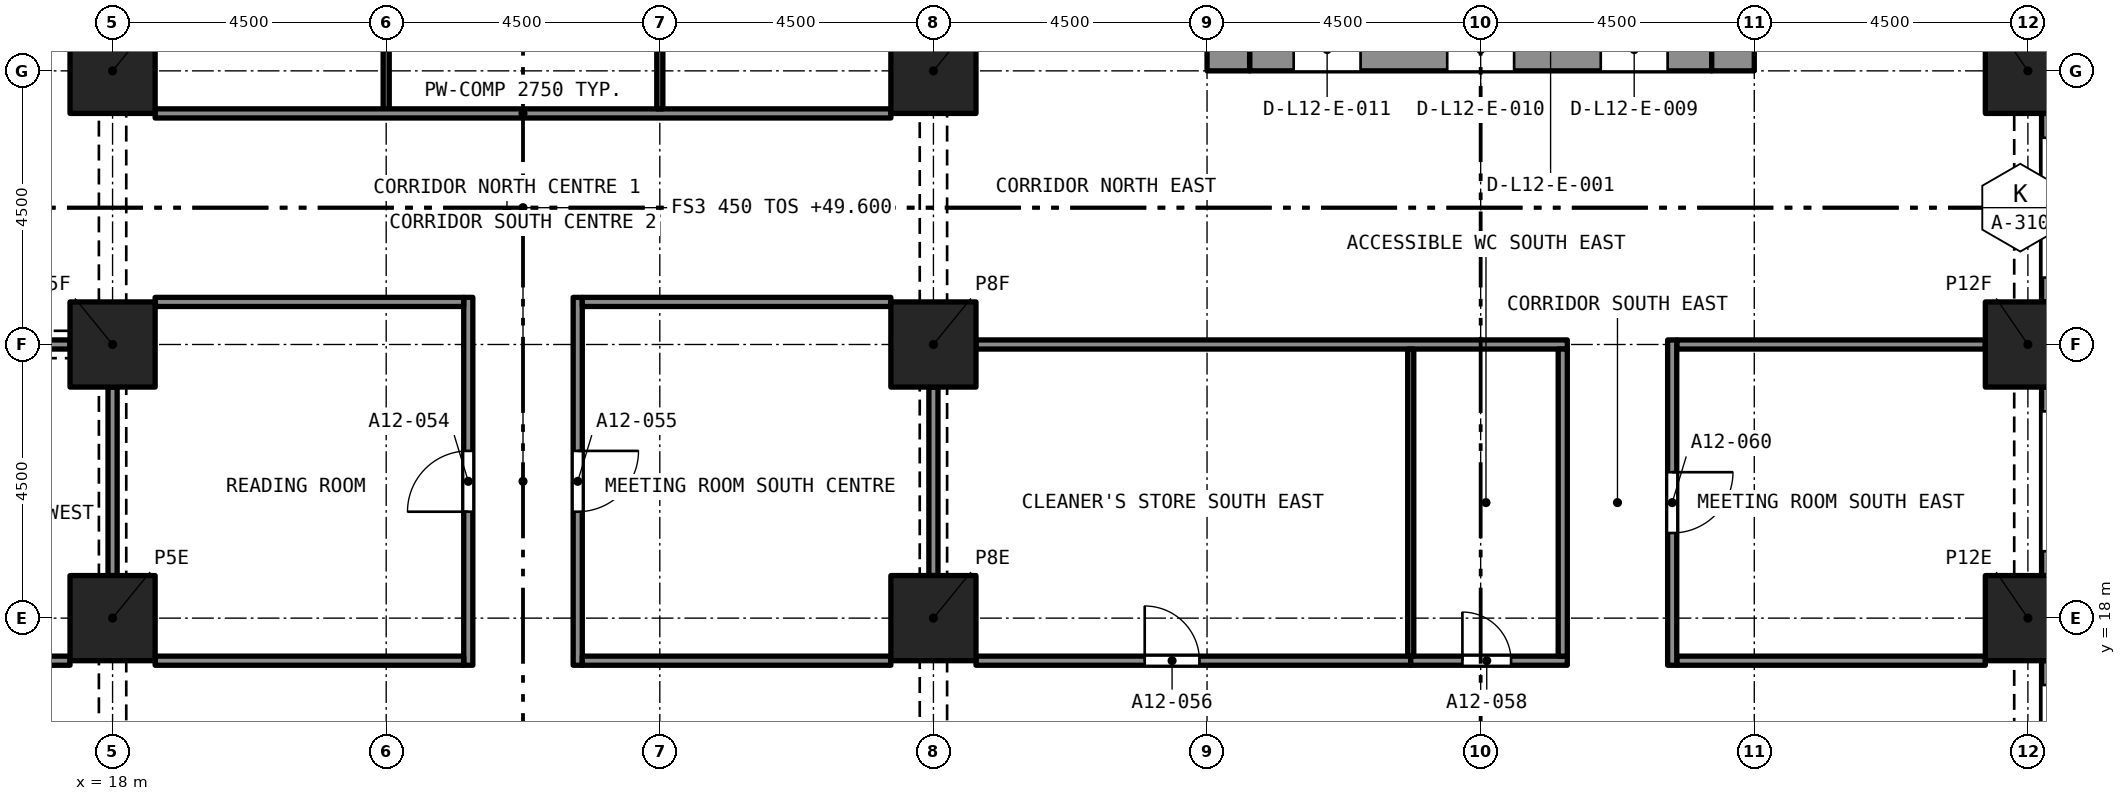
"""IFC4 building model, lengths in metres.
Left out: names, types, materials, properties, quantities, classifications, styles, units other than length and angle.
Written with IfcOpenShell. Run it as: python <this file> out.ifc"""

import sys

from ifc_helpers import new_model, si_unit, direction, frame, frame_2d, origin, origin_2d, place, context, subcontext, project, spatial, rectangle, extrude, element, fill, save


model = new_model("IFC4")
c1 = context("Model", 3, precision=1e-05, world=origin(), true_north=direction((0.0, 1.0)))
c2 = subcontext(c1, "Body", "Model", "MODEL_VIEW")
j1 = project(units=[si_unit("LENGTHUNIT", "METRE"), si_unit("PLANEANGLEUNIT", "RADIAN")], contexts=[c1])
p1 = place(None, origin())
s1 = spatial("IfcSite", under=j1, at=p1, CompositionType="ELEMENT")
p2 = place(p1, origin())
s2 = spatial("IfcBuilding", under=s1, at=p2, CompositionType="ELEMENT")
p3 = place(p2, frame((0.0, 0.0, 49.6)))
s3 = spatial("IfcBuildingStorey", under=s2, at=p3, CompositionType="ELEMENT", Elevation=49.6)
for number, where, z_axis, x_axis in (
    (1, (18.0, 18.0, 0.0), (0.0, 0.0, 1.0), (1.0, 0.0, 0.0)),
    (2, (31.5, 18.0, 0.0), (0.0, 0.0, 1.0), (1.0, 0.0, 0.0)),
    (3, (49.5, 18.0, 0.0), (0.0, 0.0, 1.0), (1.0, 0.0, 0.0)),
    (4, (18.0, 22.5, 0.0), (0.0, 0.0, 1.0), (1.0, 0.0, 0.0)),
    (5, (31.5, 22.5, 0.0), (0.0, 0.0, 1.0), (1.0, 0.0, 0.0)),
    (6, (49.5, 22.5, 0.0), (0.0, 0.0, 1.0), (1.0, 0.0, 0.0)),
    (7, (18.0, 27.0, 0.0), (0.0, 0.0, 1.0), (1.0, 0.0, 0.0)),
    (8, (31.5, 27.0, 0.0), (0.0, 0.0, 1.0), (1.0, 0.0, 0.0)),
    (9, (49.5, 27.0, 0.0), (0.0, 0.0, 1.0), (1.0, 0.0, 0.0)),
):
    element("IfcColumn", number, at=place(p3, frame(where, z_axis=z_axis, x_axis=x_axis)), inside=s3, PredefinedType="COLUMN", context=c2, shape_type="SweptSolid", body=[
        extrude(rectangle(XDim=1.4, YDim=1.4, at=origin_2d()), origin(), (0.0, 0.0, 1.0), 3.2),
    ])
p4 = place(p3, frame((36.7, 27.35, 0.0), z_axis=(0.0, 0.0, 1.0), x_axis=(1.0, 0.0, 0.0)))
e10 = element("IfcWall", 10, at=p4, inside=s3, PredefinedType="SOLIDWALL", context=c2, shape_type="SweptSolid", body=[
    extrude(rectangle(XDim=7.6, YDim=0.7, at=frame_2d((3.8, 0.0))), origin(), (0.0, 0.0, 1.0), 3.2),
])
p5 = place(p4, frame((5.775, 0.0, 0.0)))
e11 = element("IfcOpeningElement", 11, at=p5, cuts=e10, PredefinedType="OPENING", context=c2, shape_type="SweptSolid", body=[
    extrude(rectangle(XDim=1.1, YDim=2.1, at=frame_2d((0.55, 1.05))), frame((0.0, 0.36, 0.0), z_axis=(0.0, -1.0, 0.0), x_axis=(1.0, 0.0, 0.0)), (0.0, 0.0, 1.0), 0.72),
])
p6 = place(p4, frame((3.25, 0.0, 0.0)))
e12 = element("IfcOpeningElement", 12, at=p6, cuts=e10, PredefinedType="OPENING", context=c2, shape_type="SweptSolid", body=[
    extrude(rectangle(XDim=1.1, YDim=2.1, at=frame_2d((0.55, 1.05))), frame((0.0, 0.36, 0.0), z_axis=(0.0, -1.0, 0.0), x_axis=(1.0, 0.0, 0.0)), (0.0, 0.0, 1.0), 0.72),
])
p7 = place(p4, frame((0.725, 0.0, 0.0)))
e13 = element("IfcOpeningElement", 13, at=p7, cuts=e10, PredefinedType="OPENING", context=c2, shape_type="SweptSolid", body=[
    extrude(rectangle(XDim=1.1, YDim=2.1, at=frame_2d((0.55, 1.05))), frame((0.0, 0.36, 0.0), z_axis=(0.0, -1.0, 0.0), x_axis=(1.0, 0.0, 0.0)), (0.0, 0.0, 1.0), 0.72),
])
p8 = place(p3, frame((36.35, 27.0, 0.0), z_axis=(0.0, 0.0, 1.0), x_axis=(0.0, 1.0, 0.0)))
e14 = element("IfcWall", 14, at=p8, inside=s3, PredefinedType="SOLIDWALL", context=c2, shape_type="SweptSolid", body=[
    extrude(rectangle(XDim=13.5, YDim=0.7, at=frame_2d((6.75, 0.0))), origin(), (0.0, 0.0, 1.0), 3.2),
])
p9 = place(p8, frame((8.95, 0.0, 0.0)))
e15 = element("IfcOpeningElement", 15, at=p9, cuts=e14, PredefinedType="OPENING", context=c2, shape_type="SweptSolid", body=[
    extrude(rectangle(XDim=1.2, YDim=2.1, at=frame_2d((0.6, 1.05))), frame((0.0, 0.36, 0.0), z_axis=(0.0, -1.0, 0.0), x_axis=(1.0, 0.0, 0.0)), (0.0, 0.0, 1.0), 0.72),
])
p10 = place(p3, frame((44.65, 27.0, 0.0), z_axis=(0.0, 0.0, 1.0), x_axis=(0.0, 1.0, 0.0)))
e16 = element("IfcWall", 16, at=p10, inside=s3, PredefinedType="SOLIDWALL", context=c2, shape_type="SweptSolid", body=[
    extrude(rectangle(XDim=13.5, YDim=0.7, at=frame_2d((6.75, 0.0))), origin(), (0.0, 0.0, 1.0), 3.2),
])
p11 = place(p10, frame((8.95, 0.0, 0.0)))
e17 = element("IfcOpeningElement", 17, at=p11, cuts=e16, PredefinedType="OPENING", context=c2, shape_type="SweptSolid", body=[
    extrude(rectangle(XDim=1.2, YDim=2.1, at=frame_2d((0.6, 1.05))), frame((0.0, 0.36, 0.0), z_axis=(0.0, -1.0, 0.0), x_axis=(1.0, 0.0, 0.0)), (0.0, 0.0, 1.0), 0.72),
])
p12 = place(p3, frame((49.875, 17.3, 0.0), z_axis=(0.0, 0.0, 1.0), x_axis=(0.0, -1.0, 0.0)))
e18 = element("IfcWall", 18, at=p12, inside=s3, PredefinedType="SOLIDWALL", context=c2, shape_type="SweptSolid", body=[
    extrude(rectangle(XDim=3.1, YDim=0.3, at=frame_2d((1.55, 0.0))), origin(), (0.0, 0.0, 1.0), 3.2),
])
p13 = place(p12, frame((0.4, 0.0, 0.45)))
e19 = element("IfcOpeningElement", 19, at=p13, cuts=e18, PredefinedType="OPENING", context=c2, shape_type="SweptSolid", body=[
    extrude(rectangle(XDim=2.3, YDim=1.95, at=frame_2d((1.15, 0.975))), frame((0.0, 0.16, 0.0), z_axis=(0.0, -1.0, 0.0), x_axis=(1.0, 0.0, 0.0)), (0.0, 0.0, 1.0), 0.32),
])
p14 = place(p3, frame((49.875, 21.8, 0.0), z_axis=(0.0, 0.0, 1.0), x_axis=(0.0, -1.0, 0.0)))
e20 = element("IfcWall", 20, at=p14, inside=s3, PredefinedType="SOLIDWALL", context=c2, shape_type="SweptSolid", body=[
    extrude(rectangle(XDim=3.1, YDim=0.3, at=frame_2d((1.55, 0.0))), origin(), (0.0, 0.0, 1.0), 3.2),
])
p15 = place(p14, frame((0.4, 0.0, 0.45)))
e21 = element("IfcOpeningElement", 21, at=p15, cuts=e20, PredefinedType="OPENING", context=c2, shape_type="SweptSolid", body=[
    extrude(rectangle(XDim=2.3, YDim=1.95, at=frame_2d((1.15, 0.975))), frame((0.0, 0.16, 0.0), z_axis=(0.0, -1.0, 0.0), x_axis=(1.0, 0.0, 0.0)), (0.0, 0.0, 1.0), 0.32),
])
p16 = place(p3, frame((49.875, 26.3, 0.0), z_axis=(0.0, 0.0, 1.0), x_axis=(0.0, -1.0, 0.0)))
e22 = element("IfcWall", 22, at=p16, inside=s3, PredefinedType="SOLIDWALL", context=c2, shape_type="SweptSolid", body=[
    extrude(rectangle(XDim=3.1, YDim=0.3, at=frame_2d((1.55, 0.0))), origin(), (0.0, 0.0, 1.0), 3.2),
])
p17 = place(p16, frame((0.4, 0.0, 0.45)))
e23 = element("IfcOpeningElement", 23, at=p17, cuts=e22, PredefinedType="OPENING", context=c2, shape_type="SweptSolid", body=[
    extrude(rectangle(XDim=2.3, YDim=1.95, at=frame_2d((1.15, 0.975))), frame((0.0, 0.16, 0.0), z_axis=(0.0, -1.0, 0.0), x_axis=(1.0, 0.0, 0.0)), (0.0, 0.0, 1.0), 0.32),
])
p18 = place(p3, frame((23.85, 17.225, 0.0), z_axis=(0.0, 0.0, 1.0), x_axis=(0.0, 1.0, 0.0)))
e24 = element("IfcWall", 24, at=p18, inside=s3, PredefinedType="PARTITIONING", context=c2, shape_type="SweptSolid", body=[
    extrude(rectangle(XDim=6.05, YDim=0.15, at=frame_2d((3.025, 0.0))), origin(), (0.0, 0.0, 1.0), 2.75),
])
p19 = place(p18, frame((2.525, 0.0, 0.0)))
e25 = element("IfcOpeningElement", 25, at=p19, cuts=e24, PredefinedType="OPENING", context=c2, shape_type="SweptSolid", body=[
    extrude(rectangle(XDim=1.0, YDim=2.1, at=frame_2d((0.5, 1.05))), frame((0.0, 0.085, 0.0), z_axis=(0.0, -1.0, 0.0), x_axis=(1.0, 0.0, 0.0)), (0.0, 0.0, 1.0), 0.17),
])
p20 = place(p3, frame((25.65, 23.275, 0.0), z_axis=(0.0, 0.0, 1.0), x_axis=(0.0, -1.0, 0.0)))
e26 = element("IfcWall", 26, at=p20, inside=s3, PredefinedType="PARTITIONING", context=c2, shape_type="SweptSolid", body=[
    extrude(rectangle(XDim=6.05, YDim=0.15, at=frame_2d((3.025, 0.0))), origin(), (0.0, 0.0, 1.0), 2.75),
])
p21 = place(p20, frame((2.525, 0.0, 0.0)))
e27 = element("IfcOpeningElement", 27, at=p21, cuts=e26, PredefinedType="OPENING", context=c2, shape_type="SweptSolid", body=[
    extrude(rectangle(XDim=1.0, YDim=2.1, at=frame_2d((0.5, 1.05))), frame((0.0, 0.085, 0.0), z_axis=(0.0, -1.0, 0.0), x_axis=(1.0, 0.0, 0.0)), (0.0, 0.0, 1.0), 0.17),
])
for number, where, z_axis, x_axis in (
    (28, (18.7, 17.3, 0.0), (0.0, 0.0, 1.0), (1.0, 0.0, 0.0)),
    (29, (25.725, 17.3, 0.0), (0.0, 0.0, 1.0), (1.0, 0.0, 0.0)),
):
    element("IfcWall", number, at=place(p3, frame(where, z_axis=z_axis, x_axis=x_axis)), inside=s3, PredefinedType="PARTITIONING", context=c2, shape_type="SweptSolid", body=[
        extrude(rectangle(XDim=5.075, YDim=0.15, at=frame_2d((2.538, 0.0))), origin(), (0.0, 0.0, 1.0), 2.75),
    ])
p22 = place(p3, frame((32.2, 17.3, 0.0), z_axis=(0.0, 0.0, 1.0), x_axis=(1.0, 0.0, 0.0)))
e30 = element("IfcWall", 30, at=p22, inside=s3, PredefinedType="PARTITIONING", context=c2, shape_type="SweptSolid", body=[
    extrude(rectangle(XDim=7.15, YDim=0.15, at=frame_2d((3.575, 0.0))), origin(), (0.0, 0.0, 1.0), 2.9),
])
p23 = place(p22, frame((2.775, 0.0, 0.0)))
e31 = element("IfcOpeningElement", 31, at=p23, cuts=e30, PredefinedType="OPENING", context=c2, shape_type="SweptSolid", body=[
    extrude(rectangle(XDim=0.9, YDim=2.1, at=frame_2d((0.45, 1.05))), frame((0.0, 0.085, 0.0), z_axis=(0.0, -1.0, 0.0), x_axis=(1.0, 0.0, 0.0)), (0.0, 0.0, 1.0), 0.17),
])
p24 = place(p3, frame((10.15, 17.3, 0.0), z_axis=(0.0, 0.0, 1.0), x_axis=(1.0, 0.0, 0.0)))
e32 = element("IfcWall", 32, at=p24, inside=s3, PredefinedType="PARTITIONING", context=c2, shape_type="SweptSolid", body=[
    extrude(rectangle(XDim=7.15, YDim=0.15, at=frame_2d((3.575, 0.0))), origin(), (0.0, 0.0, 1.0), 2.9),
])
p25 = place(p24, frame((3.475, 0.0, 0.0)))
e33 = element("IfcOpeningElement", 33, at=p25, cuts=e32, PredefinedType="OPENING", context=c2, shape_type="SweptSolid", body=[
    extrude(rectangle(XDim=0.9, YDim=2.1, at=frame_2d((0.45, 1.05))), frame((0.0, 0.085, 0.0), z_axis=(0.0, -1.0, 0.0), x_axis=(1.0, 0.0, 0.0)), (0.0, 0.0, 1.0), 0.17),
])
p26 = place(p3, frame((39.35, 17.3, 0.0), z_axis=(0.0, 0.0, 1.0), x_axis=(1.0, 0.0, 0.0)))
e34 = element("IfcWall", 34, at=p26, inside=s3, PredefinedType="PARTITIONING", context=c2, shape_type="SweptSolid", body=[
    extrude(rectangle(XDim=2.575, YDim=0.15, at=frame_2d((1.288, 0.0))), origin(), (0.0, 0.0, 1.0), 2.9),
])
p27 = place(p26, frame((0.85, 0.0, 0.0)))
e35 = element("IfcOpeningElement", 35, at=p27, cuts=e34, PredefinedType="OPENING", context=c2, shape_type="SweptSolid", body=[
    extrude(rectangle(XDim=0.8, YDim=2.1, at=frame_2d((0.4, 1.05))), frame((0.0, 0.085, 0.0), z_axis=(0.0, -1.0, 0.0), x_axis=(1.0, 0.0, 0.0)), (0.0, 0.0, 1.0), 0.17),
])
p28 = place(p3, frame((43.725, 17.3, 0.0), z_axis=(0.0, 0.0, 1.0), x_axis=(1.0, 0.0, 0.0)))
e36 = element("IfcWall", 36, at=p28, inside=s3, PredefinedType="PARTITIONING", context=c2, shape_type="SweptSolid", body=[
    extrude(rectangle(XDim=5.075, YDim=0.15, at=frame_2d((2.538, 0.0))), origin(), (0.0, 0.0, 1.0), 2.9),
])
p29 = place(p3, frame((22.5, 26.375, 0.0), z_axis=(0.0, 0.0, 1.0), x_axis=(0.0, 1.0, 0.0)))
e37 = element("IfcWall", 37, at=p29, inside=s3, PredefinedType="PARTITIONING", context=c2, shape_type="SweptSolid", body=[
    extrude(rectangle(XDim=10.25, YDim=0.1, at=frame_2d((5.125, 0.0))), origin(), (0.0, 0.0, 1.0), 2.75),
])
p30 = place(p3, frame((18.7, 26.3, 0.0), z_axis=(0.0, 0.0, 1.0), x_axis=(1.0, 0.0, 0.0)))
e38 = element("IfcWall", 38, at=p30, inside=s3, PredefinedType="PARTITIONING", context=c2, shape_type="SweptSolid", body=[
    extrude(rectangle(XDim=12.1, YDim=0.15, at=frame_2d((6.05, 0.0))), origin(), (0.0, 0.0, 1.0), 2.75),
])
p31 = place(p3, frame((27.0, 26.375, 0.0), z_axis=(0.0, 0.0, 1.0), x_axis=(0.0, 1.0, 0.0)))
e39 = element("IfcWall", 39, at=p31, inside=s3, PredefinedType="PARTITIONING", context=c2, shape_type="SweptSolid", body=[
    extrude(rectangle(XDim=10.25, YDim=0.1, at=frame_2d((5.125, 0.0))), origin(), (0.0, 0.0, 1.0), 2.75),
])
p32 = place(p3, frame((18.7, 23.2, 0.0), z_axis=(0.0, 0.0, 1.0), x_axis=(1.0, 0.0, 0.0)))
e40 = element("IfcWall", 40, at=p32, inside=s3, PredefinedType="PARTITIONING", context=c2, shape_type="SweptSolid", body=[
    extrude(rectangle(XDim=5.075, YDim=0.15, at=frame_2d((2.538, 0.0))), origin(), (0.0, 0.0, 1.0), 2.75),
])
p33 = place(p3, frame((18.0, 18.7, 0.0), z_axis=(0.0, 0.0, 1.0), x_axis=(0.0, 1.0, 0.0)))
e41 = element("IfcWall", 41, at=p33, inside=s3, PredefinedType="PARTITIONING", context=c2, shape_type="SweptSolid", body=[
    extrude(rectangle(XDim=3.1, YDim=0.15, at=frame_2d((1.55, 0.0))), origin(), (0.0, 0.0, 1.0), 2.38),
])
p34 = place(p3, frame((25.725, 23.2, 0.0), z_axis=(0.0, 0.0, 1.0), x_axis=(1.0, 0.0, 0.0)))
e42 = element("IfcWall", 42, at=p34, inside=s3, PredefinedType="PARTITIONING", context=c2, shape_type="SweptSolid", body=[
    extrude(rectangle(XDim=5.075, YDim=0.15, at=frame_2d((2.538, 0.0))), origin(), (0.0, 0.0, 1.0), 2.75),
])
p35 = place(p3, frame((31.5, 18.7, 0.0), z_axis=(0.0, 0.0, 1.0), x_axis=(0.0, 1.0, 0.0)))
e43 = element("IfcWall", 43, at=p35, inside=s3, PredefinedType="PARTITIONING", context=c2, shape_type="SweptSolid", body=[
    extrude(rectangle(XDim=3.1, YDim=0.15, at=frame_2d((1.55, 0.0))), origin(), (0.0, 0.0, 1.0), 2.38),
])
p36 = place(p3, frame((32.2, 22.5, 0.0), z_axis=(0.0, 0.0, 1.0), x_axis=(1.0, 0.0, 0.0)))
e44 = element("IfcWall", 44, at=p36, inside=s3, PredefinedType="PARTITIONING", context=c2, shape_type="SweptSolid", body=[
    extrude(rectangle(XDim=9.725, YDim=0.15, at=frame_2d((4.863, 0.0))), origin(), (0.0, 0.0, 1.0), 2.9),
])
p37 = place(p3, frame((43.725, 22.5, 0.0), z_axis=(0.0, 0.0, 1.0), x_axis=(1.0, 0.0, 0.0)))
e45 = element("IfcWall", 45, at=p37, inside=s3, PredefinedType="PARTITIONING", context=c2, shape_type="SweptSolid", body=[
    extrude(rectangle(XDim=5.075, YDim=0.15, at=frame_2d((2.538, 0.0))), origin(), (0.0, 0.0, 1.0), 2.9),
])
p38 = place(p3, frame((14.2, 22.5, 0.0), z_axis=(0.0, 0.0, 1.0), x_axis=(1.0, 0.0, 0.0)))
e46 = element("IfcWall", 46, at=p38, inside=s3, PredefinedType="PARTITIONING", context=c2, shape_type="SweptSolid", body=[
    extrude(rectangle(XDim=3.1, YDim=0.15, at=frame_2d((1.55, 0.0))), origin(), (0.0, 0.0, 1.0), 2.38),
])
p39 = place(p3, frame((41.85, 17.375, 0.0), z_axis=(0.0, 0.0, 1.0), x_axis=(0.0, 1.0, 0.0)))
e47 = element("IfcWall", 47, at=p39, inside=s3, PredefinedType="PARTITIONING", context=c2, shape_type="SweptSolid", body=[
    extrude(rectangle(XDim=5.05, YDim=0.15, at=frame_2d((2.525, 0.0))), origin(), (0.0, 0.0, 1.0), 2.9),
])
p40 = place(p3, frame((43.65, 22.575, 0.0), z_axis=(0.0, 0.0, 1.0), x_axis=(0.0, -1.0, 0.0)))
e48 = element("IfcWall", 48, at=p40, inside=s3, PredefinedType="PARTITIONING", context=c2, shape_type="SweptSolid", body=[
    extrude(rectangle(XDim=5.35, YDim=0.15, at=frame_2d((2.675, 0.0))), origin(), (0.0, 0.0, 1.0), 2.9),
])
p41 = place(p40, frame((2.175, 0.0, 0.0)))
e49 = element("IfcOpeningElement", 49, at=p41, cuts=e48, PredefinedType="OPENING", context=c2, shape_type="SweptSolid", body=[
    extrude(rectangle(XDim=1.0, YDim=2.1, at=frame_2d((0.5, 1.05))), frame((0.0, 0.085, 0.0), z_axis=(0.0, -1.0, 0.0), x_axis=(1.0, 0.0, 0.0)), (0.0, 0.0, 1.0), 0.17),
])
p42 = place(p3, frame((39.35, 17.375, 0.0), z_axis=(0.0, 0.0, 1.0), x_axis=(0.0, 1.0, 0.0)))
e50 = element("IfcWall", 50, at=p42, inside=s3, PredefinedType="PARTITIONING", context=c2, shape_type="SweptSolid", body=[
    extrude(rectangle(XDim=5.05, YDim=0.1, at=frame_2d((2.525, 0.0))), origin(), (0.0, 0.0, 1.0), 2.9),
])
p43 = place(p19, origin())
e51 = element("IfcDoor", 51, at=p43, inside=s3, OperationType="SINGLE_SWING_RIGHT", PredefinedType="DOOR", context=c2, shape_type="SweptSolid", body=[
    extrude(rectangle(XDim=1.0, YDim=2.1, at=frame_2d((0.5, 1.05))), frame((0.0, 0.025, 0.0), z_axis=(0.0, -1.0, 0.0), x_axis=(1.0, 0.0, 0.0)), (0.0, 0.0, 1.0), 0.05),
])
fill(e25, e51)
p44 = place(p21, origin())
e52 = element("IfcDoor", 52, at=p44, inside=s3, OperationType="SINGLE_SWING_RIGHT", PredefinedType="DOOR", context=c2, shape_type="SweptSolid", body=[
    extrude(rectangle(XDim=1.0, YDim=2.1, at=frame_2d((0.5, 1.05))), frame((0.0, 0.025, 0.0), z_axis=(0.0, -1.0, 0.0), x_axis=(1.0, 0.0, 0.0)), (0.0, 0.0, 1.0), 0.05),
])
fill(e27, e52)
p45 = place(p23, origin())
e53 = element("IfcDoor", 53, at=p45, inside=s3, OperationType="SINGLE_SWING_LEFT", PredefinedType="DOOR", context=c2, shape_type="SweptSolid", body=[
    extrude(rectangle(XDim=0.9, YDim=2.1, at=frame_2d((0.45, 1.05))), frame((0.0, 0.025, 0.0), z_axis=(0.0, -1.0, 0.0), x_axis=(1.0, 0.0, 0.0)), (0.0, 0.0, 1.0), 0.05),
])
fill(e31, e53)
p46 = place(p27, origin())
e54 = element("IfcDoor", 54, at=p46, inside=s3, OperationType="SINGLE_SWING_LEFT", PredefinedType="DOOR", context=c2, shape_type="SweptSolid", body=[
    extrude(rectangle(XDim=0.8, YDim=2.1, at=frame_2d((0.4, 1.05))), frame((0.0, 0.025, 0.0), z_axis=(0.0, -1.0, 0.0), x_axis=(1.0, 0.0, 0.0)), (0.0, 0.0, 1.0), 0.05),
])
fill(e35, e54)
p47 = place(p41, origin())
e55 = element("IfcDoor", 55, at=p47, inside=s3, OperationType="SINGLE_SWING_RIGHT", PredefinedType="DOOR", context=c2, shape_type="SweptSolid", body=[
    extrude(rectangle(XDim=1.0, YDim=2.1, at=frame_2d((0.5, 1.05))), frame((0.0, 0.025, 0.0), z_axis=(0.0, -1.0, 0.0), x_axis=(1.0, 0.0, 0.0)), (0.0, 0.0, 1.0), 0.05),
])
fill(e49, e55)
save(model, sys.argv[1])
